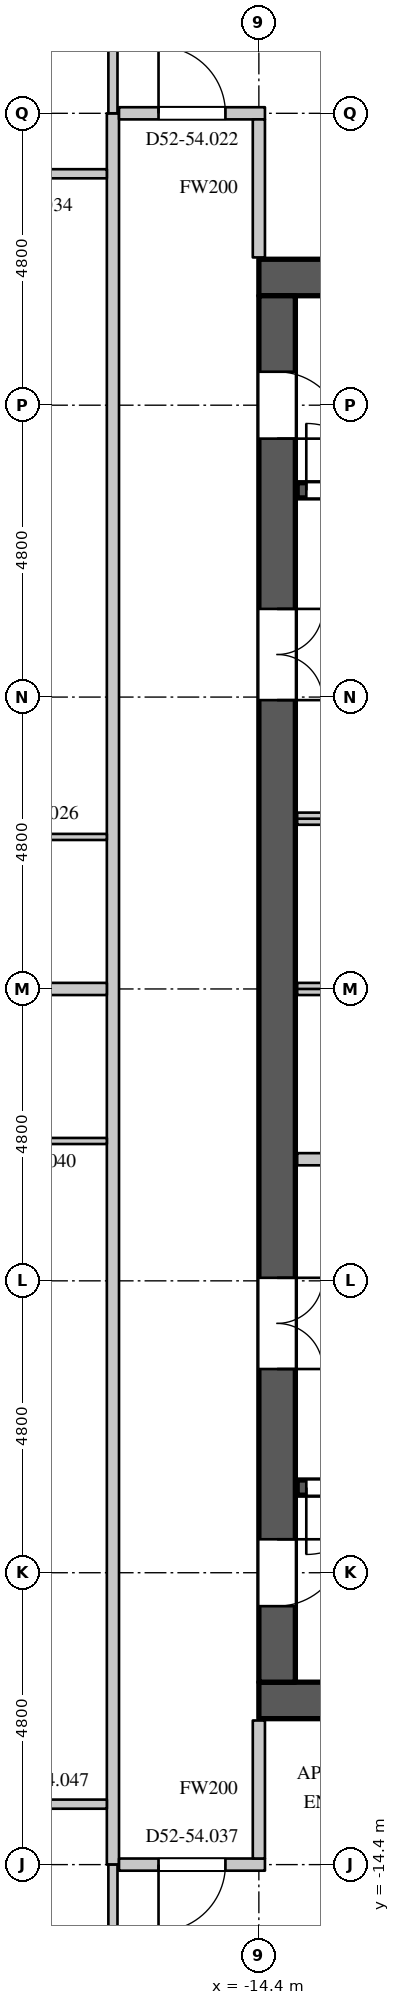
"""IFC4 building model, lengths in metres.
Left out: names, types, materials, properties, quantities, classifications, styles, units other than length and angle.
Written with IfcOpenShell. Run it as: python <this file> out.ifc"""

import sys

from ifc_helpers import new_model, si_unit, direction, frame, frame_2d, origin, place, context, subcontext, project, spatial, rectangle, extrude, element, fill, save


model = new_model("IFC4")
c1 = context("Model", 3, precision=1e-05, world=origin(), true_north=direction((0.0, 1.0)))
c2 = subcontext(c1, "Body", "Model", "MODEL_VIEW")
j1 = project(units=[si_unit("LENGTHUNIT", "METRE"), si_unit("PLANEANGLEUNIT", "RADIAN")], contexts=[c1])
p1 = place(None, origin())
s1 = spatial("IfcSite", under=j1, at=p1, CompositionType="ELEMENT")
p2 = place(p1, origin())
s2 = spatial("IfcBuilding", under=s1, at=p2, CompositionType="ELEMENT")
p3 = place(p2, frame((0.0, 0.0, 226.5)))
s3 = spatial("IfcBuildingStorey", under=s2, at=p3, CompositionType="ELEMENT", Elevation=226.5)
for number, where, z_axis, x_axis in (
    (1, (-14.4, 11.7, 0.0), (0.0, 0.0, 1.0), (1.0, 0.0, 0.0)),
    (2, (-14.4, -11.7, 0.0), (0.0, 0.0, 1.0), (1.0, 0.0, 0.0)),
):
    element("IfcWall", number, at=place(p3, frame(where, z_axis=z_axis, x_axis=x_axis)), inside=s3, PredefinedType="SHEAR", context=c2, shape_type="SweptSolid", body=[
        extrude(rectangle(XDim=28.8, YDim=0.6, at=frame_2d((14.4, 0.0))), origin(), (0.0, 0.0, 1.0), 4.2),
    ])
p4 = place(p3, frame((-14.1, -11.4, 0.0), z_axis=(0.0, 0.0, 1.0), x_axis=(0.0, 1.0, 0.0)))
e3 = element("IfcWall", 3, at=p4, inside=s3, PredefinedType="SHEAR", context=c2, shape_type="SweptSolid", body=[
    extrude(rectangle(XDim=22.8, YDim=0.6, at=frame_2d((11.4, 0.0))), origin(), (0.0, 0.0, 1.0), 4.2),
])
p5 = place(p4, frame((20.45, 0.0, 0.0)))
e4 = element("IfcOpeningElement", 4, at=p5, cuts=e3, PredefinedType="OPENING", context=c2, shape_type="SweptSolid", body=[
    extrude(rectangle(XDim=1.1, YDim=2.2, at=frame_2d((0.55, 1.1))), frame((0.0, 0.31, 0.0), z_axis=(0.0, -1.0, 0.0), x_axis=(1.0, 0.0, 0.0)), (0.0, 0.0, 1.0), 0.62),
])
p6 = place(p4, frame((1.25, 0.0, 0.0)))
e5 = element("IfcOpeningElement", 5, at=p6, cuts=e3, PredefinedType="OPENING", context=c2, shape_type="SweptSolid", body=[
    extrude(rectangle(XDim=1.1, YDim=2.2, at=frame_2d((0.55, 1.1))), frame((0.0, 0.31, 0.0), z_axis=(0.0, -1.0, 0.0), x_axis=(1.0, 0.0, 0.0)), (0.0, 0.0, 1.0), 0.62),
])
p7 = place(p4, frame((16.15, 0.0, 0.0)))
e6 = element("IfcOpeningElement", 6, at=p7, cuts=e3, PredefinedType="OPENING", context=c2, shape_type="SweptSolid", body=[
    extrude(rectangle(XDim=1.5, YDim=2.4, at=frame_2d((0.75, 1.2))), frame((0.0, 0.31, 0.0), z_axis=(0.0, -1.0, 0.0), x_axis=(1.0, 0.0, 0.0)), (0.0, 0.0, 1.0), 0.62),
])
p8 = place(p4, frame((5.15, 0.0, 0.0)))
e7 = element("IfcOpeningElement", 7, at=p8, cuts=e3, PredefinedType="OPENING", context=c2, shape_type="SweptSolid", body=[
    extrude(rectangle(XDim=1.5, YDim=2.4, at=frame_2d((0.75, 1.2))), frame((0.0, 0.31, 0.0), z_axis=(0.0, -1.0, 0.0), x_axis=(1.0, 0.0, 0.0)), (0.0, 0.0, 1.0), 0.62),
])
p9 = place(p3, frame((-16.8, -14.4, 0.0), z_axis=(0.0, 0.0, 1.0), x_axis=(0.0, 1.0, 0.0)))
e8 = element("IfcWall", 8, at=p9, inside=s3, PredefinedType="PARTITIONING", context=c2, shape_type="SweptSolid", body=[
    extrude(rectangle(XDim=28.8, YDim=0.2, at=frame_2d((14.4, 0.0))), origin(), (0.0, 0.0, 1.0), 3.95),
])
p10 = place(p3, frame((-16.7, -14.4, 0.0), z_axis=(0.0, 0.0, 1.0), x_axis=(1.0, 0.0, 0.0)))
e9 = element("IfcWall", 9, at=p10, inside=s3, PredefinedType="PARTITIONING", context=c2, shape_type="SweptSolid", body=[
    extrude(rectangle(XDim=2.4, YDim=0.2, at=frame_2d((1.2, 0.0))), origin(), (0.0, 0.0, 1.0), 3.95),
])
p11 = place(p10, frame((0.65, 0.0, 0.0)))
e10 = element("IfcOpeningElement", 10, at=p11, cuts=e9, PredefinedType="OPENING", context=c2, shape_type="SweptSolid", body=[
    extrude(rectangle(XDim=1.1, YDim=2.4, at=frame_2d((0.55, 1.2))), frame((0.0, 0.11, 0.0), z_axis=(0.0, -1.0, 0.0), x_axis=(1.0, 0.0, 0.0)), (0.0, 0.0, 1.0), 0.22),
])
p12 = place(p3, frame((-16.7, 14.4, 0.0), z_axis=(0.0, 0.0, 1.0), x_axis=(1.0, 0.0, 0.0)))
e11 = element("IfcWall", 11, at=p12, inside=s3, PredefinedType="PARTITIONING", context=c2, shape_type="SweptSolid", body=[
    extrude(rectangle(XDim=2.4, YDim=0.2, at=frame_2d((1.2, 0.0))), origin(), (0.0, 0.0, 1.0), 3.95),
])
p13 = place(p12, frame((0.65, 0.0, 0.0)))
e12 = element("IfcOpeningElement", 12, at=p13, cuts=e11, PredefinedType="OPENING", context=c2, shape_type="SweptSolid", body=[
    extrude(rectangle(XDim=1.1, YDim=2.4, at=frame_2d((0.55, 1.2))), frame((0.0, 0.11, 0.0), z_axis=(0.0, -1.0, 0.0), x_axis=(1.0, 0.0, 0.0)), (0.0, 0.0, 1.0), 0.22),
])
for number, where, z_axis, x_axis in (
    (13, (-14.4, -14.3, 0.0), (0.0, 0.0, 1.0), (0.0, 1.0, 0.0)),
    (14, (-14.4, 12.03, 0.0), (0.0, 0.0, 1.0), (0.0, 1.0, 0.0)),
):
    element("IfcWall", number, at=place(p3, frame(where, z_axis=z_axis, x_axis=x_axis)), inside=s3, PredefinedType="PARTITIONING", context=c2, shape_type="SweptSolid", body=[
        extrude(rectangle(XDim=2.27, YDim=0.2, at=frame_2d((1.135, 0.0))), origin(), (0.0, 0.0, 1.0), 3.95),
    ])
p14 = place(p3, frame((-25.224, -13.406, 0.0), z_axis=(0.0, 0.0, 1.0), x_axis=(1.0, 0.0, 0.0)))
e15 = element("IfcWall", 15, at=p14, inside=s3, PredefinedType="PARTITIONING", context=c2, shape_type="SweptSolid", body=[
    extrude(rectangle(XDim=8.324, YDim=0.15, at=frame_2d((4.162, 0.0))), origin(), (0.0, 0.0, 1.0), 3.95),
])
p15 = place(p14, frame((6.143, 0.0, 0.0)))
e16 = element("IfcOpeningElement", 16, at=p15, cuts=e15, PredefinedType="OPENING", context=c2, shape_type="SweptSolid", body=[
    extrude(rectangle(XDim=0.95, YDim=2.2, at=frame_2d((0.475, 1.1))), frame((0.0, 0.085, 0.0), z_axis=(0.0, -1.0, 0.0), x_axis=(1.0, 0.0, 0.0)), (0.0, 0.0, 1.0), 0.17),
])
p16 = place(p14, frame((1.843, 0.0, 0.0)))
e17 = element("IfcOpeningElement", 17, at=p16, cuts=e15, PredefinedType="OPENING", context=c2, shape_type="SweptSolid", body=[
    extrude(rectangle(XDim=0.95, YDim=2.2, at=frame_2d((0.475, 1.1))), frame((0.0, 0.085, 0.0), z_axis=(0.0, -1.0, 0.0), x_axis=(1.0, 0.0, 0.0)), (0.0, 0.0, 1.0), 0.17),
])
p17 = place(p3, frame((-25.224, 13.406, 0.0), z_axis=(0.0, 0.0, 1.0), x_axis=(1.0, 0.0, 0.0)))
e18 = element("IfcWall", 18, at=p17, inside=s3, PredefinedType="PARTITIONING", context=c2, shape_type="SweptSolid", body=[
    extrude(rectangle(XDim=8.324, YDim=0.15, at=frame_2d((4.162, 0.0))), origin(), (0.0, 0.0, 1.0), 3.95),
])
p18 = place(p17, frame((5.993, 0.0, 0.0)))
e19 = element("IfcOpeningElement", 19, at=p18, cuts=e18, PredefinedType="OPENING", context=c2, shape_type="SweptSolid", body=[
    extrude(rectangle(XDim=0.95, YDim=2.2, at=frame_2d((0.475, 1.1))), frame((0.0, 0.085, 0.0), z_axis=(0.0, -1.0, 0.0), x_axis=(1.0, 0.0, 0.0)), (0.0, 0.0, 1.0), 0.17),
])
p19 = place(p17, frame((1.743, 0.0, 0.0)))
e20 = element("IfcOpeningElement", 20, at=p19, cuts=e18, PredefinedType="OPENING", context=c2, shape_type="SweptSolid", body=[
    extrude(rectangle(XDim=0.95, YDim=2.2, at=frame_2d((0.475, 1.1))), frame((0.0, 0.085, 0.0), z_axis=(0.0, -1.0, 0.0), x_axis=(1.0, 0.0, 0.0)), (0.0, 0.0, 1.0), 0.17),
])
p20 = place(p3, frame((-16.8, -19.828, 0.0), z_axis=(0.0, 0.0, 1.0), x_axis=(0.0, 1.0, 0.0)))
e21 = element("IfcWall", 21, at=p20, inside=s3, PredefinedType="PARTITIONING", context=c2, shape_type="SweptSolid", body=[
    extrude(rectangle(XDim=5.428, YDim=0.15, at=frame_2d((2.714, 0.0))), origin(), (0.0, 0.0, 1.0), 3.95),
])
p21 = place(p20, frame((3.05, 0.0, 0.0)))
e22 = element("IfcOpeningElement", 22, at=p21, cuts=e21, PredefinedType="OPENING", context=c2, shape_type="SweptSolid", body=[
    extrude(rectangle(XDim=0.95, YDim=2.2, at=frame_2d((0.475, 1.1))), frame((0.0, 0.085, 0.0), z_axis=(0.0, -1.0, 0.0), x_axis=(1.0, 0.0, 0.0)), (0.0, 0.0, 1.0), 0.17),
])
p22 = place(p3, frame((-16.8, 14.4, 0.0), z_axis=(0.0, 0.0, 1.0), x_axis=(0.0, 1.0, 0.0)))
e23 = element("IfcWall", 23, at=p22, inside=s3, PredefinedType="PARTITIONING", context=c2, shape_type="SweptSolid", body=[
    extrude(rectangle(XDim=5.428, YDim=0.15, at=frame_2d((2.714, 0.0))), origin(), (0.0, 0.0, 1.0), 3.95),
])
p23 = place(p22, frame((1.5, 0.0, 0.0)))
e24 = element("IfcOpeningElement", 24, at=p23, cuts=e23, PredefinedType="OPENING", context=c2, shape_type="SweptSolid", body=[
    extrude(rectangle(XDim=0.95, YDim=2.2, at=frame_2d((0.475, 1.1))), frame((0.0, 0.085, 0.0), z_axis=(0.0, -1.0, 0.0), x_axis=(1.0, 0.0, 0.0)), (0.0, 0.0, 1.0), 0.17),
])
p24 = place(p3, frame((-26.455, 0.0, 0.0), z_axis=(0.0, 0.0, 1.0), x_axis=(1.0, 0.0, 0.0)))
e25 = element("IfcWall", 25, at=p24, inside=s3, PredefinedType="PARTITIONING", context=c2, shape_type="SweptSolid", body=[
    extrude(rectangle(XDim=9.555, YDim=0.2, at=frame_2d((4.778, 0.0))), origin(), (0.0, 0.0, 1.0), 3.95),
])
p25 = place(p3, frame((-13.77, -2.8, 0.0), z_axis=(0.0, 0.0, 1.0), x_axis=(1.0, 0.0, 0.0)))
e26 = element("IfcWall", 26, at=p25, inside=s3, PredefinedType="PARTITIONING", context=c2, shape_type="SweptSolid", body=[
    extrude(rectangle(XDim=3.37, YDim=0.2, at=frame_2d((1.685, 0.0))), origin(), (0.0, 0.0, 1.0), 3.95),
])
p26 = place(p25, frame((1.35, 0.0, 0.0)))
e27 = element("IfcOpeningElement", 27, at=p26, cuts=e26, PredefinedType="OPENING", context=c2, shape_type="SweptSolid", body=[
    extrude(rectangle(XDim=0.6, YDim=2.0, at=frame_2d((0.3, 1.0))), frame((0.0, 0.11, 0.0), z_axis=(0.0, -1.0, 0.0), x_axis=(1.0, 0.0, 0.0)), (0.0, 0.0, 1.0), 0.22),
])
p27 = place(p3, frame((-13.77, 0.0, 0.0), z_axis=(0.0, 0.0, 1.0), x_axis=(1.0, 0.0, 0.0)))
e28 = element("IfcWall", 28, at=p27, inside=s3, PredefinedType="PARTITIONING", context=c2, shape_type="SweptSolid", body=[
    extrude(rectangle(XDim=21.57, YDim=0.2, at=frame_2d((10.785, 0.0))), origin(), (0.0, 0.0, 1.0), 3.95),
])
p28 = place(p3, frame((-13.77, 2.8, 0.0), z_axis=(0.0, 0.0, 1.0), x_axis=(1.0, 0.0, 0.0)))
e29 = element("IfcWall", 29, at=p28, inside=s3, PredefinedType="PARTITIONING", context=c2, shape_type="SweptSolid", body=[
    extrude(rectangle(XDim=5.97, YDim=0.2, at=frame_2d((2.985, 0.0))), origin(), (0.0, 0.0, 1.0), 3.95),
])
p29 = place(p28, frame((1.1, 0.0, 0.0)))
e30 = element("IfcOpeningElement", 30, at=p29, cuts=e29, PredefinedType="OPENING", context=c2, shape_type="SweptSolid", body=[
    extrude(rectangle(XDim=1.1, YDim=2.2, at=frame_2d((0.55, 1.1))), frame((0.0, 0.11, 0.0), z_axis=(0.0, -1.0, 0.0), x_axis=(1.0, 0.0, 0.0)), (0.0, 0.0, 1.0), 0.22),
])
p30 = place(p28, frame((4.1, 0.0, 0.0)))
e31 = element("IfcOpeningElement", 31, at=p30, cuts=e29, PredefinedType="OPENING", context=c2, shape_type="SweptSolid", body=[
    extrude(rectangle(XDim=1.1, YDim=2.2, at=frame_2d((0.55, 1.1))), frame((0.0, 0.11, 0.0), z_axis=(0.0, -1.0, 0.0), x_axis=(1.0, 0.0, 0.0)), (0.0, 0.0, 1.0), 0.22),
])
p31 = place(p3, frame((-13.77, -8.2, 0.0), z_axis=(0.0, 0.0, 1.0), x_axis=(1.0, 0.0, 0.0)))
e32 = element("IfcWall", 32, at=p31, inside=s3, PredefinedType="SHEAR", context=c2, shape_type="SweptSolid", body=[
    extrude(rectangle(XDim=8.495, YDim=0.25, at=frame_2d((4.248, 0.0))), origin(), (0.0, 0.0, 1.0), 3.95),
])
p32 = place(p31, frame((0.15, 0.0, 0.0)))
e33 = element("IfcOpeningElement", 33, at=p32, cuts=e32, PredefinedType="OPENING", context=c2, shape_type="SweptSolid", body=[
    extrude(rectangle(XDim=1.1, YDim=2.2, at=frame_2d((0.55, 1.1))), frame((0.0, 0.135, 0.0), z_axis=(0.0, -1.0, 0.0), x_axis=(1.0, 0.0, 0.0)), (0.0, 0.0, 1.0), 0.27),
])
p33 = place(p3, frame((-13.77, 8.2, 0.0), z_axis=(0.0, 0.0, 1.0), x_axis=(1.0, 0.0, 0.0)))
e34 = element("IfcWall", 34, at=p33, inside=s3, PredefinedType="SHEAR", context=c2, shape_type="SweptSolid", body=[
    extrude(rectangle(XDim=8.495, YDim=0.25, at=frame_2d((4.248, 0.0))), origin(), (0.0, 0.0, 1.0), 3.95),
])
p34 = place(p33, frame((0.15, 0.0, 0.0)))
e35 = element("IfcOpeningElement", 35, at=p34, cuts=e34, PredefinedType="OPENING", context=c2, shape_type="SweptSolid", body=[
    extrude(rectangle(XDim=1.1, YDim=2.2, at=frame_2d((0.55, 1.1))), frame((0.0, 0.135, 0.0), z_axis=(0.0, -1.0, 0.0), x_axis=(1.0, 0.0, 0.0)), (0.0, 0.0, 1.0), 0.27),
])
p35 = place(p3, frame((-20.575, 2.5, 0.0), z_axis=(0.0, 0.0, 1.0), x_axis=(1.0, 0.0, 0.0)))
e36 = element("IfcWall", 36, at=p35, inside=s3, PredefinedType="PARTITIONING", context=c2, shape_type="SweptSolid", body=[
    extrude(rectangle(XDim=3.675, YDim=0.1, at=frame_2d((1.837, 0.0))), origin(), (0.0, 0.0, 1.0), 3.95),
])
p36 = place(p35, frame((1.35, 0.0, 0.0)))
e37 = element("IfcOpeningElement", 37, at=p36, cuts=e36, PredefinedType="OPENING", context=c2, shape_type="SweptSolid", body=[
    extrude(rectangle(XDim=0.9, YDim=2.2, at=frame_2d((0.45, 1.1))), frame((0.0, 0.06, 0.0), z_axis=(0.0, -1.0, 0.0), x_axis=(1.0, 0.0, 0.0)), (0.0, 0.0, 1.0), 0.12),
])
p37 = place(p3, frame((-20.125, -2.5, 0.0), z_axis=(0.0, 0.0, 1.0), x_axis=(1.0, 0.0, 0.0)))
e38 = element("IfcWall", 38, at=p37, inside=s3, PredefinedType="PARTITIONING", context=c2, shape_type="SweptSolid", body=[
    extrude(rectangle(XDim=3.225, YDim=0.1, at=frame_2d((1.613, 0.0))), origin(), (0.0, 0.0, 1.0), 3.95),
])
p38 = place(p37, frame((1.15, 0.0, 0.0)))
e39 = element("IfcOpeningElement", 39, at=p38, cuts=e38, PredefinedType="OPENING", context=c2, shape_type="SweptSolid", body=[
    extrude(rectangle(XDim=0.9, YDim=2.2, at=frame_2d((0.45, 1.1))), frame((0.0, 0.06, 0.0), z_axis=(0.0, -1.0, 0.0), x_axis=(1.0, 0.0, 0.0)), (0.0, 0.0, 1.0), 0.12),
])
p39 = place(p34, origin())
e40 = element("IfcDoor", 40, at=p39, inside=s3, OperationType="SINGLE_SWING_LEFT", PredefinedType="DOOR", context=c2, shape_type="SweptSolid", body=[
    extrude(rectangle(XDim=1.1, YDim=2.2, at=frame_2d((0.55, 1.1))), frame((0.0, 0.025, 0.0), z_axis=(0.0, -1.0, 0.0), x_axis=(1.0, 0.0, 0.0)), (0.0, 0.0, 1.0), 0.05),
])
fill(e35, e40)
p40 = place(p32, origin())
e41 = element("IfcDoor", 41, at=p40, inside=s3, OperationType="SINGLE_SWING_RIGHT", PredefinedType="DOOR", context=c2, shape_type="SweptSolid", body=[
    extrude(rectangle(XDim=1.1, YDim=2.2, at=frame_2d((0.55, 1.1))), frame((0.0, 0.025, 0.0), z_axis=(0.0, -1.0, 0.0), x_axis=(1.0, 0.0, 0.0)), (0.0, 0.0, 1.0), 0.05),
])
fill(e33, e41)
p41 = place(p5, origin())
e42 = element("IfcDoor", 42, at=p41, inside=s3, OperationType="SINGLE_SWING_RIGHT", PredefinedType="DOOR", context=c2, shape_type="SweptSolid", body=[
    extrude(rectangle(XDim=1.1, YDim=2.2, at=frame_2d((0.55, 1.1))), frame((0.0, -0.245, 0.0), z_axis=(0.0, -1.0, 0.0), x_axis=(1.0, 0.0, 0.0)), (0.0, 0.0, 1.0), 0.05),
])
fill(e4, e42)
p42 = place(p6, origin())
e43 = element("IfcDoor", 43, at=p42, inside=s3, OperationType="SINGLE_SWING_LEFT", PredefinedType="DOOR", context=c2, shape_type="SweptSolid", body=[
    extrude(rectangle(XDim=1.1, YDim=2.2, at=frame_2d((0.55, 1.1))), frame((0.0, -0.245, 0.0), z_axis=(0.0, -1.0, 0.0), x_axis=(1.0, 0.0, 0.0)), (0.0, 0.0, 1.0), 0.05),
])
fill(e5, e43)
p43 = place(p7, origin())
e44 = element("IfcDoor", 44, at=p43, inside=s3, OperationType="DOUBLE_DOOR_SINGLE_SWING", PredefinedType="DOOR", context=c2, shape_type="SweptSolid", body=[
    extrude(rectangle(XDim=1.5, YDim=2.4, at=frame_2d((0.75, 1.2))), frame((0.0, -0.245, 0.0), z_axis=(0.0, -1.0, 0.0), x_axis=(1.0, 0.0, 0.0)), (0.0, 0.0, 1.0), 0.05),
])
fill(e6, e44)
p44 = place(p8, origin())
e45 = element("IfcDoor", 45, at=p44, inside=s3, OperationType="DOUBLE_DOOR_SINGLE_SWING", PredefinedType="DOOR", context=c2, shape_type="SweptSolid", body=[
    extrude(rectangle(XDim=1.5, YDim=2.4, at=frame_2d((0.75, 1.2))), frame((0.0, -0.245, 0.0), z_axis=(0.0, -1.0, 0.0), x_axis=(1.0, 0.0, 0.0)), (0.0, 0.0, 1.0), 0.05),
])
fill(e7, e45)
p45 = place(p13, origin())
e46 = element("IfcDoor", 46, at=p45, inside=s3, OperationType="SINGLE_SWING_LEFT", PredefinedType="DOOR", context=c2, shape_type="SweptSolid", body=[
    extrude(rectangle(XDim=1.1, YDim=2.4, at=frame_2d((0.55, 1.2))), frame((0.0, 0.025, 0.0), z_axis=(0.0, -1.0, 0.0), x_axis=(1.0, 0.0, 0.0)), (0.0, 0.0, 1.0), 0.05),
])
fill(e12, e46)
p46 = place(p11, origin())
e47 = element("IfcDoor", 47, at=p46, inside=s3, OperationType="SINGLE_SWING_RIGHT", PredefinedType="DOOR", context=c2, shape_type="SweptSolid", body=[
    extrude(rectangle(XDim=1.1, YDim=2.4, at=frame_2d((0.55, 1.2))), frame((0.0, 0.025, 0.0), z_axis=(0.0, -1.0, 0.0), x_axis=(1.0, 0.0, 0.0)), (0.0, 0.0, 1.0), 0.05),
])
fill(e10, e47)
save(model, sys.argv[1])
